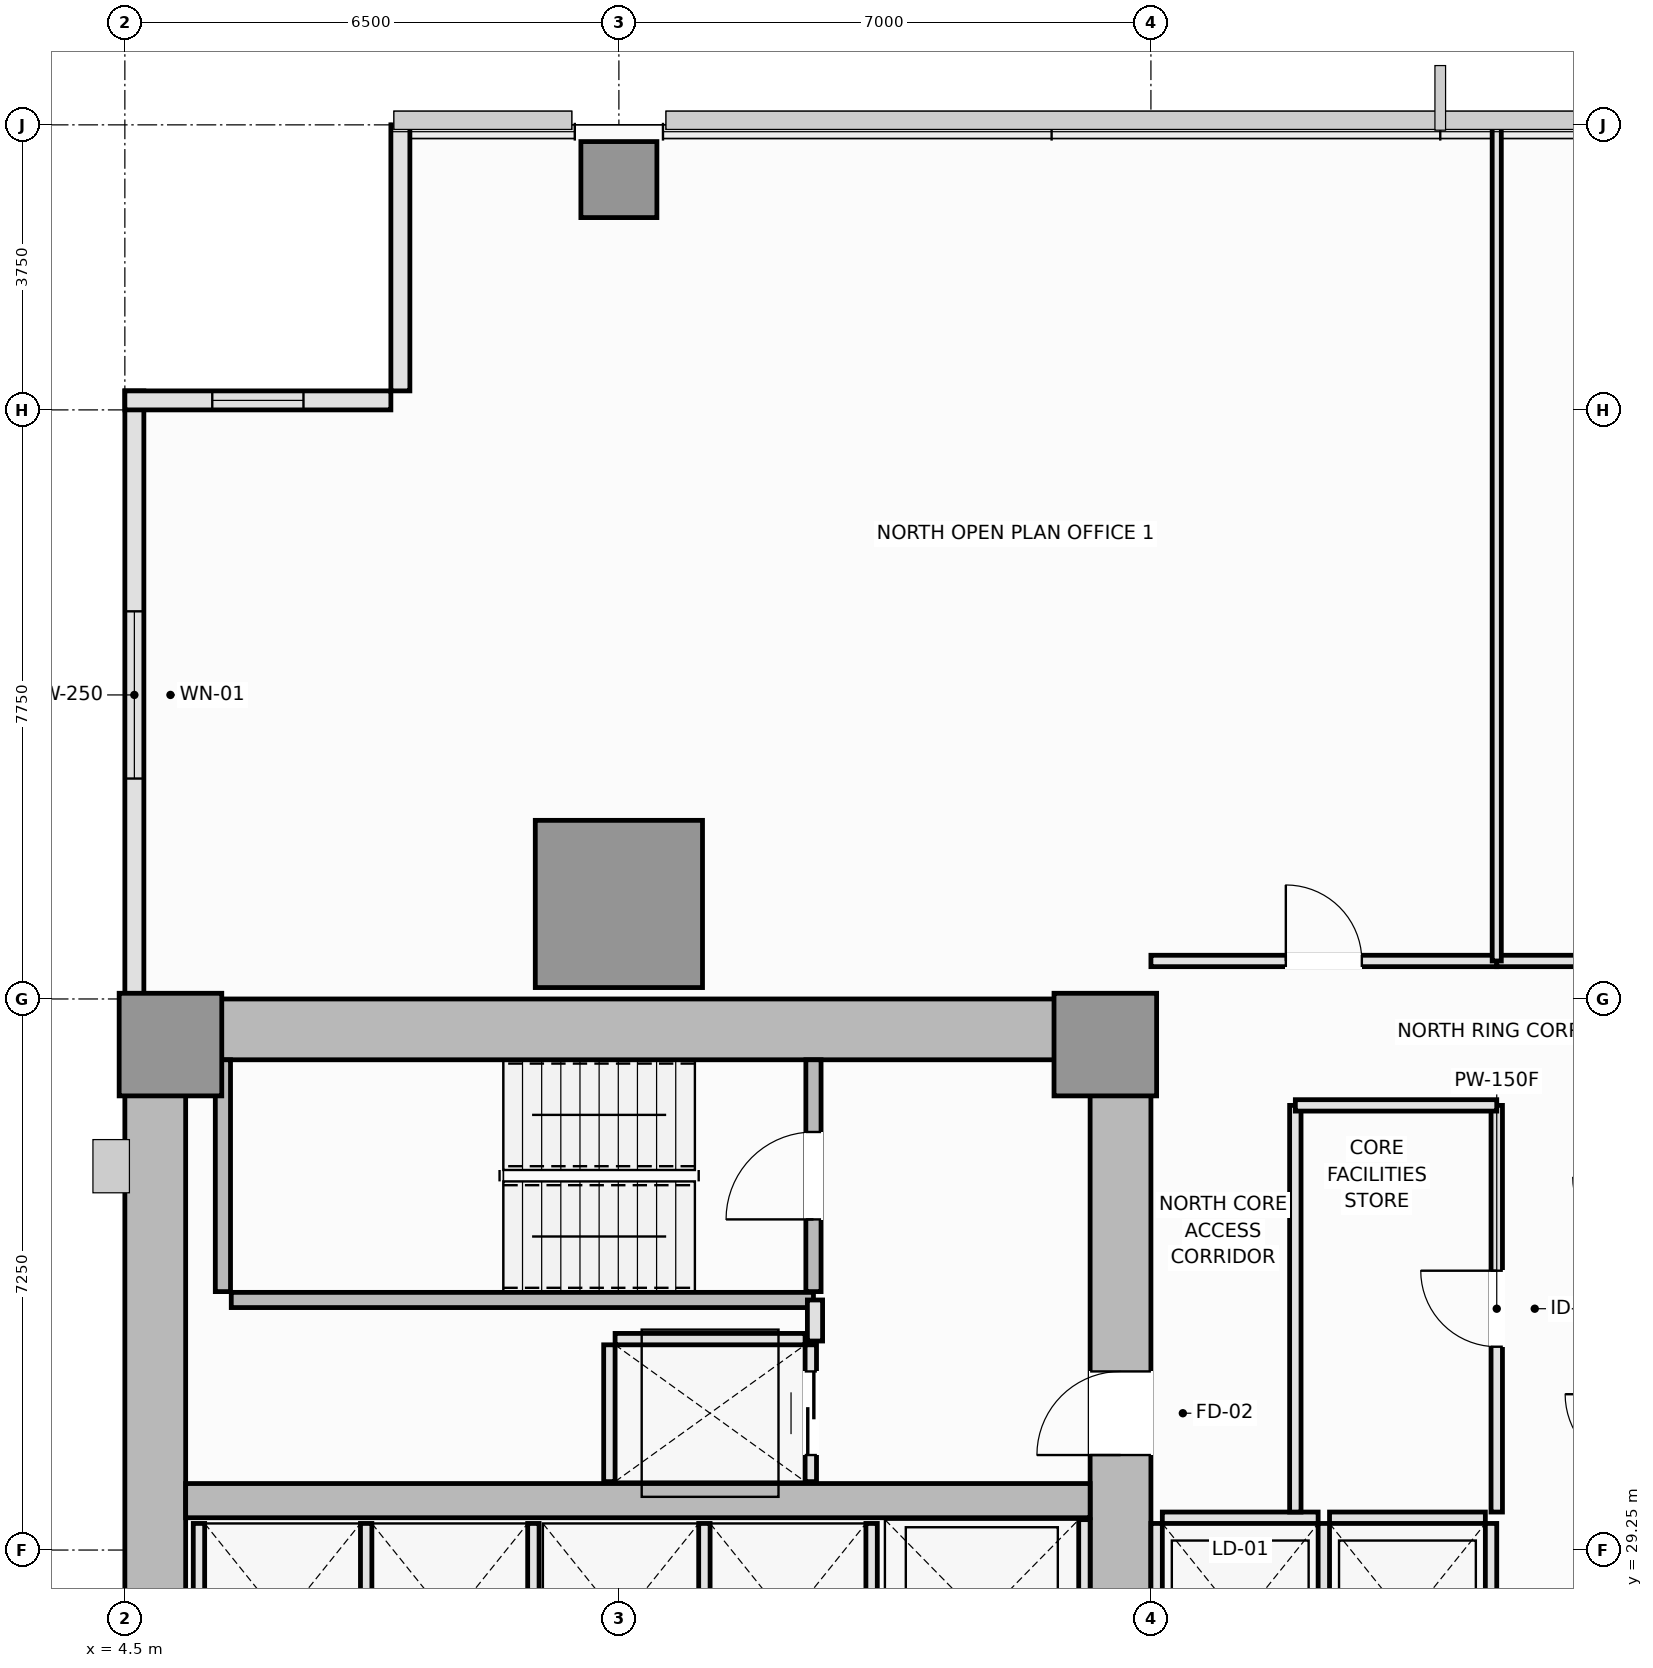
"""IFC4 building model, lengths in metres.
Left out: names, types, materials, properties, quantities, classifications, styles, units other than length and angle.
Written with IfcOpenShell. Run it as: python <this file> out.ifc"""

import sys

from ifc_helpers import new_model, si_unit, direction, frame, frame_2d, origin, origin_2d, place, context, subcontext, project, spatial, rectangle, extrude, element, fill, save


model = new_model("IFC4")
c1 = context("Model", 3, precision=1e-05, world=origin(), true_north=direction((0.0, 1.0)))
c2 = subcontext(c1, "Body", "Model", "MODEL_VIEW")
j1 = project(units=[si_unit("LENGTHUNIT", "METRE"), si_unit("PLANEANGLEUNIT", "RADIAN")], contexts=[c1])
p1 = place(None, origin())
s1 = spatial("IfcSite", under=j1, at=p1, CompositionType="ELEMENT")
p2 = place(p1, origin())
s2 = spatial("IfcBuilding", under=s1, at=p2, CompositionType="ELEMENT")
p3 = place(p2, frame((0.0, 0.0, 85.95)))
s3 = spatial("IfcBuildingStorey", under=s2, at=p3, CompositionType="ELEMENT", Elevation=85.95)
p4 = place(p3, frame((4.5, 36.1, 0.0), z_axis=(0.0, 0.0, 1.0), x_axis=(1.0, 0.0, 0.0)))
e1 = element("IfcWall", 1, at=p4, inside=s3, PredefinedType="SHEAR", context=c2, shape_type="SweptSolid", body=[
    extrude(rectangle(XDim=13.5, YDim=0.8, at=frame_2d((6.75, 0.0))), origin(), (0.0, 0.0, 1.0), 3.55),
])
p5 = place(p3, frame((4.9, 14.8, 0.0), z_axis=(0.0, 0.0, 1.0), x_axis=(0.0, 1.0, 0.0)))
e2 = element("IfcWall", 2, at=p5, inside=s3, PredefinedType="SHEAR", context=c2, shape_type="SweptSolid", body=[
    extrude(rectangle(XDim=20.9, YDim=0.8, at=frame_2d((10.45, 0.0))), origin(), (0.0, 0.0, 1.0), 3.55),
])
p6 = place(p3, frame((17.6, 27.05, 0.0), z_axis=(0.0, 0.0, 1.0), x_axis=(0.0, 1.0, 0.0)))
e3 = element("IfcWall", 3, at=p6, inside=s3, PredefinedType="SHEAR", context=c2, shape_type="SweptSolid", body=[
    extrude(rectangle(XDim=8.65, YDim=0.8, at=frame_2d((4.325, 0.0))), origin(), (0.0, 0.0, 1.0), 3.55),
])
p7 = place(p6, frame((3.45, 0.0, 0.0)))
e4 = element("IfcOpeningElement", 4, at=p7, cuts=e3, PredefinedType="OPENING", context=c2, shape_type="SweptSolid", body=[
    extrude(rectangle(XDim=1.1, YDim=2.15, at=frame_2d((0.55, 1.075))), frame((0.0, 0.41, 0.0), z_axis=(0.0, -1.0, 0.0), x_axis=(1.0, 0.0, 0.0)), (0.0, 0.0, 1.0), 0.82),
])
p8 = place(p3, frame((5.3, 29.9, 0.0), z_axis=(0.0, 0.0, 1.0), x_axis=(1.0, 0.0, 0.0)))
e5 = element("IfcWall", 5, at=p8, inside=s3, PredefinedType="SHEAR", context=c2, shape_type="SweptSolid", body=[
    extrude(rectangle(XDim=11.9, YDim=0.45, at=frame_2d((5.95, 0.0))), origin(), (0.0, 0.0, 1.0), 3.55),
])
for number, where, z_axis, x_axis in (
    (6, (5.1, 35.9, 0.0), (0.0, 0.0, 1.0), (1.0, 0.0, 0.0)),
    (7, (17.4, 35.9, 0.0), (0.0, 0.0, 1.0), (1.0, 0.0, 0.0)),
):
    element("IfcColumn", number, at=place(p3, frame(where, z_axis=z_axis, x_axis=x_axis)), inside=s3, PredefinedType="PILASTER", context=c2, shape_type="SweptSolid", body=[
        extrude(rectangle(XDim=1.35, YDim=1.35, at=origin_2d()), origin(), (0.0, 0.0, 1.0), 3.55),
    ])
p9 = place(p3, frame((11.0, 37.75, 0.0), z_axis=(0.0, 0.0, 1.0), x_axis=(1.0, 0.0, 0.0)))
e8 = element("IfcColumn", 8, at=p9, inside=s3, PredefinedType="COLUMN", context=c2, shape_type="SweptSolid", body=[
    extrude(rectangle(XDim=2.2, YDim=2.2, at=origin_2d()), origin(), (0.0, 0.0, 1.0), 3.55),
])
p10 = place(p3, frame((11.0, 47.28, 0.0), z_axis=(0.0, 0.0, 1.0), x_axis=(1.0, 0.0, 0.0)))
e9 = element("IfcColumn", 9, at=p10, inside=s3, PredefinedType="COLUMN", context=c2, shape_type="SweptSolid", body=[
    extrude(rectangle(XDim=1.0, YDim=1.0, at=origin_2d()), origin(), (0.0, 0.0, 1.0), 3.55),
])
p11 = place(p3, frame((4.625, 44.5, 0.0), z_axis=(0.0, 0.0, 1.0), x_axis=(0.0, -1.0, 0.0)))
e10 = element("IfcWall", 10, at=p11, inside=s3, PredefinedType="SOLIDWALL", context=c2, shape_type="SweptSolid", body=[
    extrude(rectangle(XDim=8.0, YDim=0.25, at=frame_2d((4.0, 0.0))), origin(), (0.0, 0.0, 1.0), 3.37),
])
p12 = place(p11, frame((2.9, 0.0, 0.9)))
e11 = element("IfcOpeningElement", 11, at=p12, cuts=e10, PredefinedType="OPENING", context=c2, shape_type="SweptSolid", body=[
    extrude(rectangle(XDim=2.2, YDim=1.8, at=frame_2d((1.1, 0.9))), frame((0.0, 0.135, 0.0), z_axis=(0.0, -1.0, 0.0), x_axis=(1.0, 0.0, 0.0)), (0.0, 0.0, 1.0), 0.27),
])
p13 = place(p3, frame((8.125, 48.0, 0.0), z_axis=(0.0, 0.0, 1.0), x_axis=(0.0, -1.0, 0.0)))
e12 = element("IfcWall", 12, at=p13, inside=s3, PredefinedType="SOLIDWALL", context=c2, shape_type="SweptSolid", body=[
    extrude(rectangle(XDim=3.5, YDim=0.25, at=frame_2d((1.75, 0.0))), origin(), (0.0, 0.0, 1.0), 3.37),
])
p14 = place(p3, frame((8.0, 44.375, 0.0), z_axis=(0.0, 0.0, 1.0), x_axis=(-1.0, 0.0, 0.0)))
e13 = element("IfcWall", 13, at=p14, inside=s3, PredefinedType="SOLIDWALL", context=c2, shape_type="SweptSolid", body=[
    extrude(rectangle(XDim=3.5, YDim=0.25, at=frame_2d((1.75, 0.0))), origin(), (0.0, 0.0, 1.0), 3.37),
])
p15 = place(p14, frame((1.15, 0.0, 0.9)))
e14 = element("IfcOpeningElement", 14, at=p15, cuts=e13, PredefinedType="OPENING", context=c2, shape_type="SweptSolid", body=[
    extrude(rectangle(XDim=1.2, YDim=1.8, at=frame_2d((0.6, 0.9))), frame((0.0, 0.135, 0.0), z_axis=(0.0, -1.0, 0.0), x_axis=(1.0, 0.0, 0.0)), (0.0, 0.0, 1.0), 0.27),
])
p16 = place(p3, frame((5.79, 32.65, 0.0), z_axis=(0.0, 0.0, 1.0), x_axis=(0.0, 1.0, 0.0)))
e15 = element("IfcWall", 15, at=p16, inside=s3, PredefinedType="SOLIDWALL", context=c2, shape_type="SweptSolid", body=[
    extrude(rectangle(XDim=3.05, YDim=0.2, at=frame_2d((1.525, 0.0))), origin(), (0.0, 0.0, 1.0), 3.55),
])
p17 = place(p3, frame((5.9, 32.54, 0.0), z_axis=(0.0, 0.0, 1.0), x_axis=(1.0, 0.0, 0.0)))
e16 = element("IfcWall", 16, at=p17, inside=s3, PredefinedType="SOLIDWALL", context=c2, shape_type="SweptSolid", body=[
    extrude(rectangle(XDim=7.66, YDim=0.2, at=frame_2d((3.83, 0.0))), origin(), (0.0, 0.0, 1.0), 3.55),
])
p18 = place(p3, frame((13.56, 32.65, 0.0), z_axis=(0.0, 0.0, 1.0), x_axis=(0.0, 1.0, 0.0)))
e17 = element("IfcWall", 17, at=p18, inside=s3, PredefinedType="SOLIDWALL", context=c2, shape_type="SweptSolid", body=[
    extrude(rectangle(XDim=3.05, YDim=0.2, at=frame_2d((1.525, 0.0))), origin(), (0.0, 0.0, 1.0), 3.55),
])
p19 = place(p18, frame((0.95, 0.0, 0.0)))
e18 = element("IfcOpeningElement", 18, at=p19, cuts=e17, PredefinedType="OPENING", context=c2, shape_type="SweptSolid", body=[
    extrude(rectangle(XDim=1.15, YDim=2.15, at=frame_2d((0.575, 1.075))), frame((0.0, 0.11, 0.0), z_axis=(0.0, -1.0, 0.0), x_axis=(1.0, 0.0, 0.0)), (0.0, 0.0, 1.0), 0.22),
])
p20 = place(p3, frame((18.15, 29.675, 0.0), z_axis=(0.0, 0.0, 1.0), x_axis=(1.0, 0.0, 0.0)))
e19 = element("IfcWall", 19, at=p20, inside=s3, PredefinedType="PARTITIONING", context=c2, shape_type="SweptSolid", body=[
    extrude(rectangle(XDim=2.05, YDim=0.15, at=frame_2d((1.025, 0.0))), origin(), (0.0, 0.0, 1.0), 3.37),
])
for number, where, z_axis, x_axis in (
    (20, (18.075, 27.05, 0.0), (0.0, 0.0, 1.0), (0.0, 1.0, 0.0)),
    (21, (20.275, 27.05, 0.0), (0.0, 0.0, 1.0), (0.0, 1.0, 0.0)),
):
    element("IfcWall", number, at=place(p3, frame(where, z_axis=z_axis, x_axis=x_axis)), inside=s3, PredefinedType="PARTITIONING", context=c2, shape_type="SweptSolid", body=[
        extrude(rectangle(XDim=2.55, YDim=0.15, at=frame_2d((1.275, 0.0))), origin(), (0.0, 0.0, 1.0), 3.37),
    ])
p21 = place(p3, frame((20.35, 29.675, 0.0), z_axis=(0.0, 0.0, 1.0), x_axis=(1.0, 0.0, 0.0)))
e22 = element("IfcWall", 22, at=p21, inside=s3, PredefinedType="PARTITIONING", context=c2, shape_type="SweptSolid", body=[
    extrude(rectangle(XDim=2.05, YDim=0.15, at=frame_2d((1.025, 0.0))), origin(), (0.0, 0.0, 1.0), 3.37),
])
for number, where, z_axis, x_axis in (
    (23, (22.475, 27.05, 0.0), (0.0, 0.0, 1.0), (0.0, 1.0, 0.0)),
    (24, (5.475, 27.05, 0.0), (0.0, 0.0, 1.0), (0.0, 1.0, 0.0)),
    (25, (7.675, 27.05, 0.0), (0.0, 0.0, 1.0), (0.0, 1.0, 0.0)),
    (26, (9.875, 27.05, 0.0), (0.0, 0.0, 1.0), (0.0, 1.0, 0.0)),
    (27, (12.125, 27.05, 0.0), (0.0, 0.0, 1.0), (0.0, 1.0, 0.0)),
    (28, (14.325, 27.05, 0.0), (0.0, 0.0, 1.0), (0.0, 1.0, 0.0)),
):
    element("IfcWall", number, at=place(p3, frame(where, z_axis=z_axis, x_axis=x_axis)), inside=s3, PredefinedType="PARTITIONING", context=c2, shape_type="SweptSolid", body=[
        extrude(rectangle(XDim=2.55, YDim=0.15, at=frame_2d((1.275, 0.0))), origin(), (0.0, 0.0, 1.0), 3.37),
    ])
p22 = place(p3, frame((17.125, 27.05, 0.0), z_axis=(0.0, 0.0, 1.0), x_axis=(0.0, 1.0, 0.0)))
e29 = element("IfcWall", 29, at=p22, inside=s3, PredefinedType="PARTITIONING", context=c2, shape_type="SweptSolid", body=[
    extrude(rectangle(XDim=2.6, YDim=0.15, at=frame_2d((1.3, 0.0))), origin(), (0.0, 0.0, 1.0), 3.37),
])
p23 = place(p3, frame((10.95, 32.025, 0.0), z_axis=(0.0, 0.0, 1.0), x_axis=(1.0, 0.0, 0.0)))
e30 = element("IfcWall", 30, at=p23, inside=s3, PredefinedType="PARTITIONING", context=c2, shape_type="SweptSolid", body=[
    extrude(rectangle(XDim=2.5, YDim=0.15, at=frame_2d((1.25, 0.0))), origin(), (0.0, 0.0, 1.0), 3.37),
])
p24 = place(p3, frame((10.875, 30.15, 0.0), z_axis=(0.0, 0.0, 1.0), x_axis=(0.0, 1.0, 0.0)))
e31 = element("IfcWall", 31, at=p24, inside=s3, PredefinedType="PARTITIONING", context=c2, shape_type="SweptSolid", body=[
    extrude(rectangle(XDim=1.8, YDim=0.15, at=frame_2d((0.9, 0.0))), origin(), (0.0, 0.0, 1.0), 3.37),
])
p25 = place(p3, frame((13.525, 30.15, 0.0), z_axis=(0.0, 0.0, 1.0), x_axis=(0.0, 1.0, 0.0)))
e32 = element("IfcWall", 32, at=p25, inside=s3, PredefinedType="PARTITIONING", context=c2, shape_type="SweptSolid", body=[
    extrude(rectangle(XDim=1.8, YDim=0.15, at=frame_2d((0.9, 0.0))), origin(), (0.0, 0.0, 1.0), 3.37),
])
p26 = place(p25, frame((0.35, 0.0, 0.0)))
e33 = element("IfcOpeningElement", 33, at=p26, cuts=e32, PredefinedType="OPENING", context=c2, shape_type="SweptSolid", body=[
    extrude(rectangle(XDim=1.1, YDim=2.2, at=frame_2d((0.55, 1.1))), frame((0.0, 0.085, 0.0), z_axis=(0.0, -1.0, 0.0), x_axis=(1.0, 0.0, 0.0)), (0.0, 0.0, 1.0), 0.17),
])
p27 = place(p3, frame((13.58, 32.0, 0.0), z_axis=(0.0, 0.0, 1.0), x_axis=(0.0, 1.0, 0.0)))
e34 = element("IfcWall", 34, at=p27, inside=s3, PredefinedType="PARTITIONING", context=c2, shape_type="SweptSolid", body=[
    extrude(rectangle(XDim=0.54, YDim=0.2, at=frame_2d((0.27, 0.0))), origin(), (0.0, 0.0, 1.0), 3.37),
])
p28 = place(p3, frame((22.55, 29.75, 0.0), z_axis=(0.0, 0.0, 1.0), x_axis=(0.0, 1.0, 0.0)))
e35 = element("IfcWall", 35, at=p28, inside=s3, PredefinedType="PARTITIONING", context=c2, shape_type="SweptSolid", body=[
    extrude(rectangle(XDim=5.35, YDim=0.15, at=frame_2d((2.675, 0.0))), origin(), (0.0, 0.0, 1.0), 3.01),
])
p29 = place(p28, frame((2.175, 0.0, 0.0)))
e36 = element("IfcOpeningElement", 36, at=p29, cuts=e35, PredefinedType="OPENING", context=c2, shape_type="SweptSolid", body=[
    extrude(rectangle(XDim=1.0, YDim=2.15, at=frame_2d((0.5, 1.075))), frame((0.0, 0.085, 0.0), z_axis=(0.0, -1.0, 0.0), x_axis=(1.0, 0.0, 0.0)), (0.0, 0.0, 1.0), 0.17),
])
p30 = place(p3, frame((19.9, 29.75, 0.0), z_axis=(0.0, 0.0, 1.0), x_axis=(0.0, 1.0, 0.0)))
e37 = element("IfcWall", 37, at=p30, inside=s3, PredefinedType="PARTITIONING", context=c2, shape_type="SweptSolid", body=[
    extrude(rectangle(XDim=5.35, YDim=0.15, at=frame_2d((2.675, 0.0))), origin(), (0.0, 0.0, 1.0), 3.37),
])
p31 = place(p3, frame((19.9, 35.1, 0.0), z_axis=(0.0, 0.0, 1.0), x_axis=(1.0, 0.0, 0.0)))
e38 = element("IfcWall", 38, at=p31, inside=s3, PredefinedType="PARTITIONING", context=c2, shape_type="SweptSolid", body=[
    extrude(rectangle(XDim=2.65, YDim=0.15, at=frame_2d((1.325, 0.0))), origin(), (0.0, 0.0, 1.0), 3.37),
])
p32 = place(p3, frame((18.0, 37.0, 0.0), z_axis=(0.0, 0.0, 1.0), x_axis=(1.0, 0.0, 0.0)))
e39 = element("IfcWall", 39, at=p32, inside=s3, PredefinedType="PARTITIONING", context=c2, shape_type="SweptSolid", body=[
    extrude(rectangle(XDim=4.55, YDim=0.15, at=frame_2d((2.275, 0.0))), origin(), (0.0, 0.0, 1.0), 3.37),
])
p33 = place(p32, frame((1.775, 0.0, 0.0)))
e40 = element("IfcOpeningElement", 40, at=p33, cuts=e39, PredefinedType="OPENING", context=c2, shape_type="SweptSolid", body=[
    extrude(rectangle(XDim=1.0, YDim=2.15, at=frame_2d((0.5, 1.075))), frame((0.0, 0.085, 0.0), z_axis=(0.0, -1.0, 0.0), x_axis=(1.0, 0.0, 0.0)), (0.0, 0.0, 1.0), 0.17),
])
p34 = place(p3, frame((22.55, 37.0, 0.0), z_axis=(0.0, 0.0, 1.0), x_axis=(1.0, 0.0, 0.0)))
e41 = element("IfcWall", 41, at=p34, inside=s3, PredefinedType="PARTITIONING", context=c2, shape_type="SweptSolid", body=[
    extrude(rectangle(XDim=8.75, YDim=0.15, at=frame_2d((4.375, 0.0))), origin(), (0.0, 0.0, 1.0), 3.37),
])
p35 = place(p34, frame((2.988, 0.0, 0.0)))
e42 = element("IfcOpeningElement", 42, at=p35, cuts=e41, PredefinedType="OPENING", context=c2, shape_type="SweptSolid", body=[
    extrude(rectangle(XDim=1.0, YDim=2.15, at=frame_2d((0.5, 1.075))), frame((0.0, 0.085, 0.0), z_axis=(0.0, -1.0, 0.0), x_axis=(1.0, 0.0, 0.0)), (0.0, 0.0, 1.0), 0.17),
])
p36 = place(p3, frame((22.55, 37.0, 0.0), z_axis=(0.0, 0.0, 1.0), x_axis=(0.0, 1.0, 0.0)))
e43 = element("IfcWall", 43, at=p36, inside=s3, PredefinedType="PARTITIONING", context=c2, shape_type="SweptSolid", body=[
    extrude(rectangle(XDim=10.99, YDim=0.12, at=frame_2d((5.495, 0.0))), origin(), (0.0, 0.0, 1.0), 3.01),
])
p37 = place(p12, origin())
e44 = element("IfcWindow", 44, at=p37, inside=s3, PartitioningType="SINGLE_PANEL", PredefinedType="WINDOW", context=c2, shape_type="SweptSolid", body=[
    extrude(rectangle(XDim=2.2, YDim=1.8, at=frame_2d((1.1, 0.9))), frame((0.0, 0.03, 0.0), z_axis=(0.0, -1.0, 0.0), x_axis=(1.0, 0.0, 0.0)), (0.0, 0.0, 1.0), 0.06),
])
fill(e11, e44)
p38 = place(p15, origin())
e45 = element("IfcWindow", 45, at=p38, inside=s3, PartitioningType="SINGLE_PANEL", PredefinedType="WINDOW", context=c2, shape_type="SweptSolid", body=[
    extrude(rectangle(XDim=1.2, YDim=1.8, at=frame_2d((0.6, 0.9))), frame((0.0, 0.03, 0.0), z_axis=(0.0, -1.0, 0.0), x_axis=(1.0, 0.0, 0.0)), (0.0, 0.0, 1.0), 0.06),
])
fill(e14, e45)
p39 = place(p19, origin())
e46 = element("IfcDoor", 46, at=p39, inside=s3, OperationType="SINGLE_SWING_LEFT", PredefinedType="DOOR", context=c2, shape_type="SweptSolid", body=[
    extrude(rectangle(XDim=1.15, YDim=2.15, at=frame_2d((0.575, 1.075))), frame((0.0, 0.025, 0.0), z_axis=(0.0, -1.0, 0.0), x_axis=(1.0, 0.0, 0.0)), (0.0, 0.0, 1.0), 0.05),
])
fill(e18, e46)
p40 = place(p26, origin())
e47 = element("IfcDoor", 47, at=p40, inside=s3, OperationType="DOUBLE_DOOR_SLIDING", PredefinedType="DOOR", context=c2, shape_type="SweptSolid", body=[
    extrude(rectangle(XDim=1.1, YDim=2.2, at=frame_2d((0.55, 1.1))), frame((0.0, 0.025, 0.0), z_axis=(0.0, -1.0, 0.0), x_axis=(1.0, 0.0, 0.0)), (0.0, 0.0, 1.0), 0.05),
])
fill(e33, e47)
p41 = place(p7, origin())
e48 = element("IfcDoor", 48, at=p41, inside=s3, OperationType="SINGLE_SWING_LEFT", PredefinedType="DOOR", context=c2, shape_type="SweptSolid", body=[
    extrude(rectangle(XDim=1.1, YDim=2.15, at=frame_2d((0.55, 1.075))), frame((0.0, 0.025, 0.0), z_axis=(0.0, -1.0, 0.0), x_axis=(1.0, 0.0, 0.0)), (0.0, 0.0, 1.0), 0.05),
])
fill(e4, e48)
p42 = place(p29, origin())
e49 = element("IfcDoor", 49, at=p42, inside=s3, OperationType="SINGLE_SWING_RIGHT", PredefinedType="DOOR", context=c2, shape_type="SweptSolid", body=[
    extrude(rectangle(XDim=1.0, YDim=2.15, at=frame_2d((0.5, 1.075))), frame((0.0, 0.025, 0.0), z_axis=(0.0, -1.0, 0.0), x_axis=(1.0, 0.0, 0.0)), (0.0, 0.0, 1.0), 0.05),
])
fill(e36, e49)
p43 = place(p33, origin())
e50 = element("IfcDoor", 50, at=p43, inside=s3, OperationType="SINGLE_SWING_LEFT", PredefinedType="DOOR", context=c2, shape_type="SweptSolid", body=[
    extrude(rectangle(XDim=1.0, YDim=2.15, at=frame_2d((0.5, 1.075))), frame((0.0, 0.025, 0.0), z_axis=(0.0, -1.0, 0.0), x_axis=(1.0, 0.0, 0.0)), (0.0, 0.0, 1.0), 0.05),
])
fill(e40, e50)
save(model, sys.argv[1])
